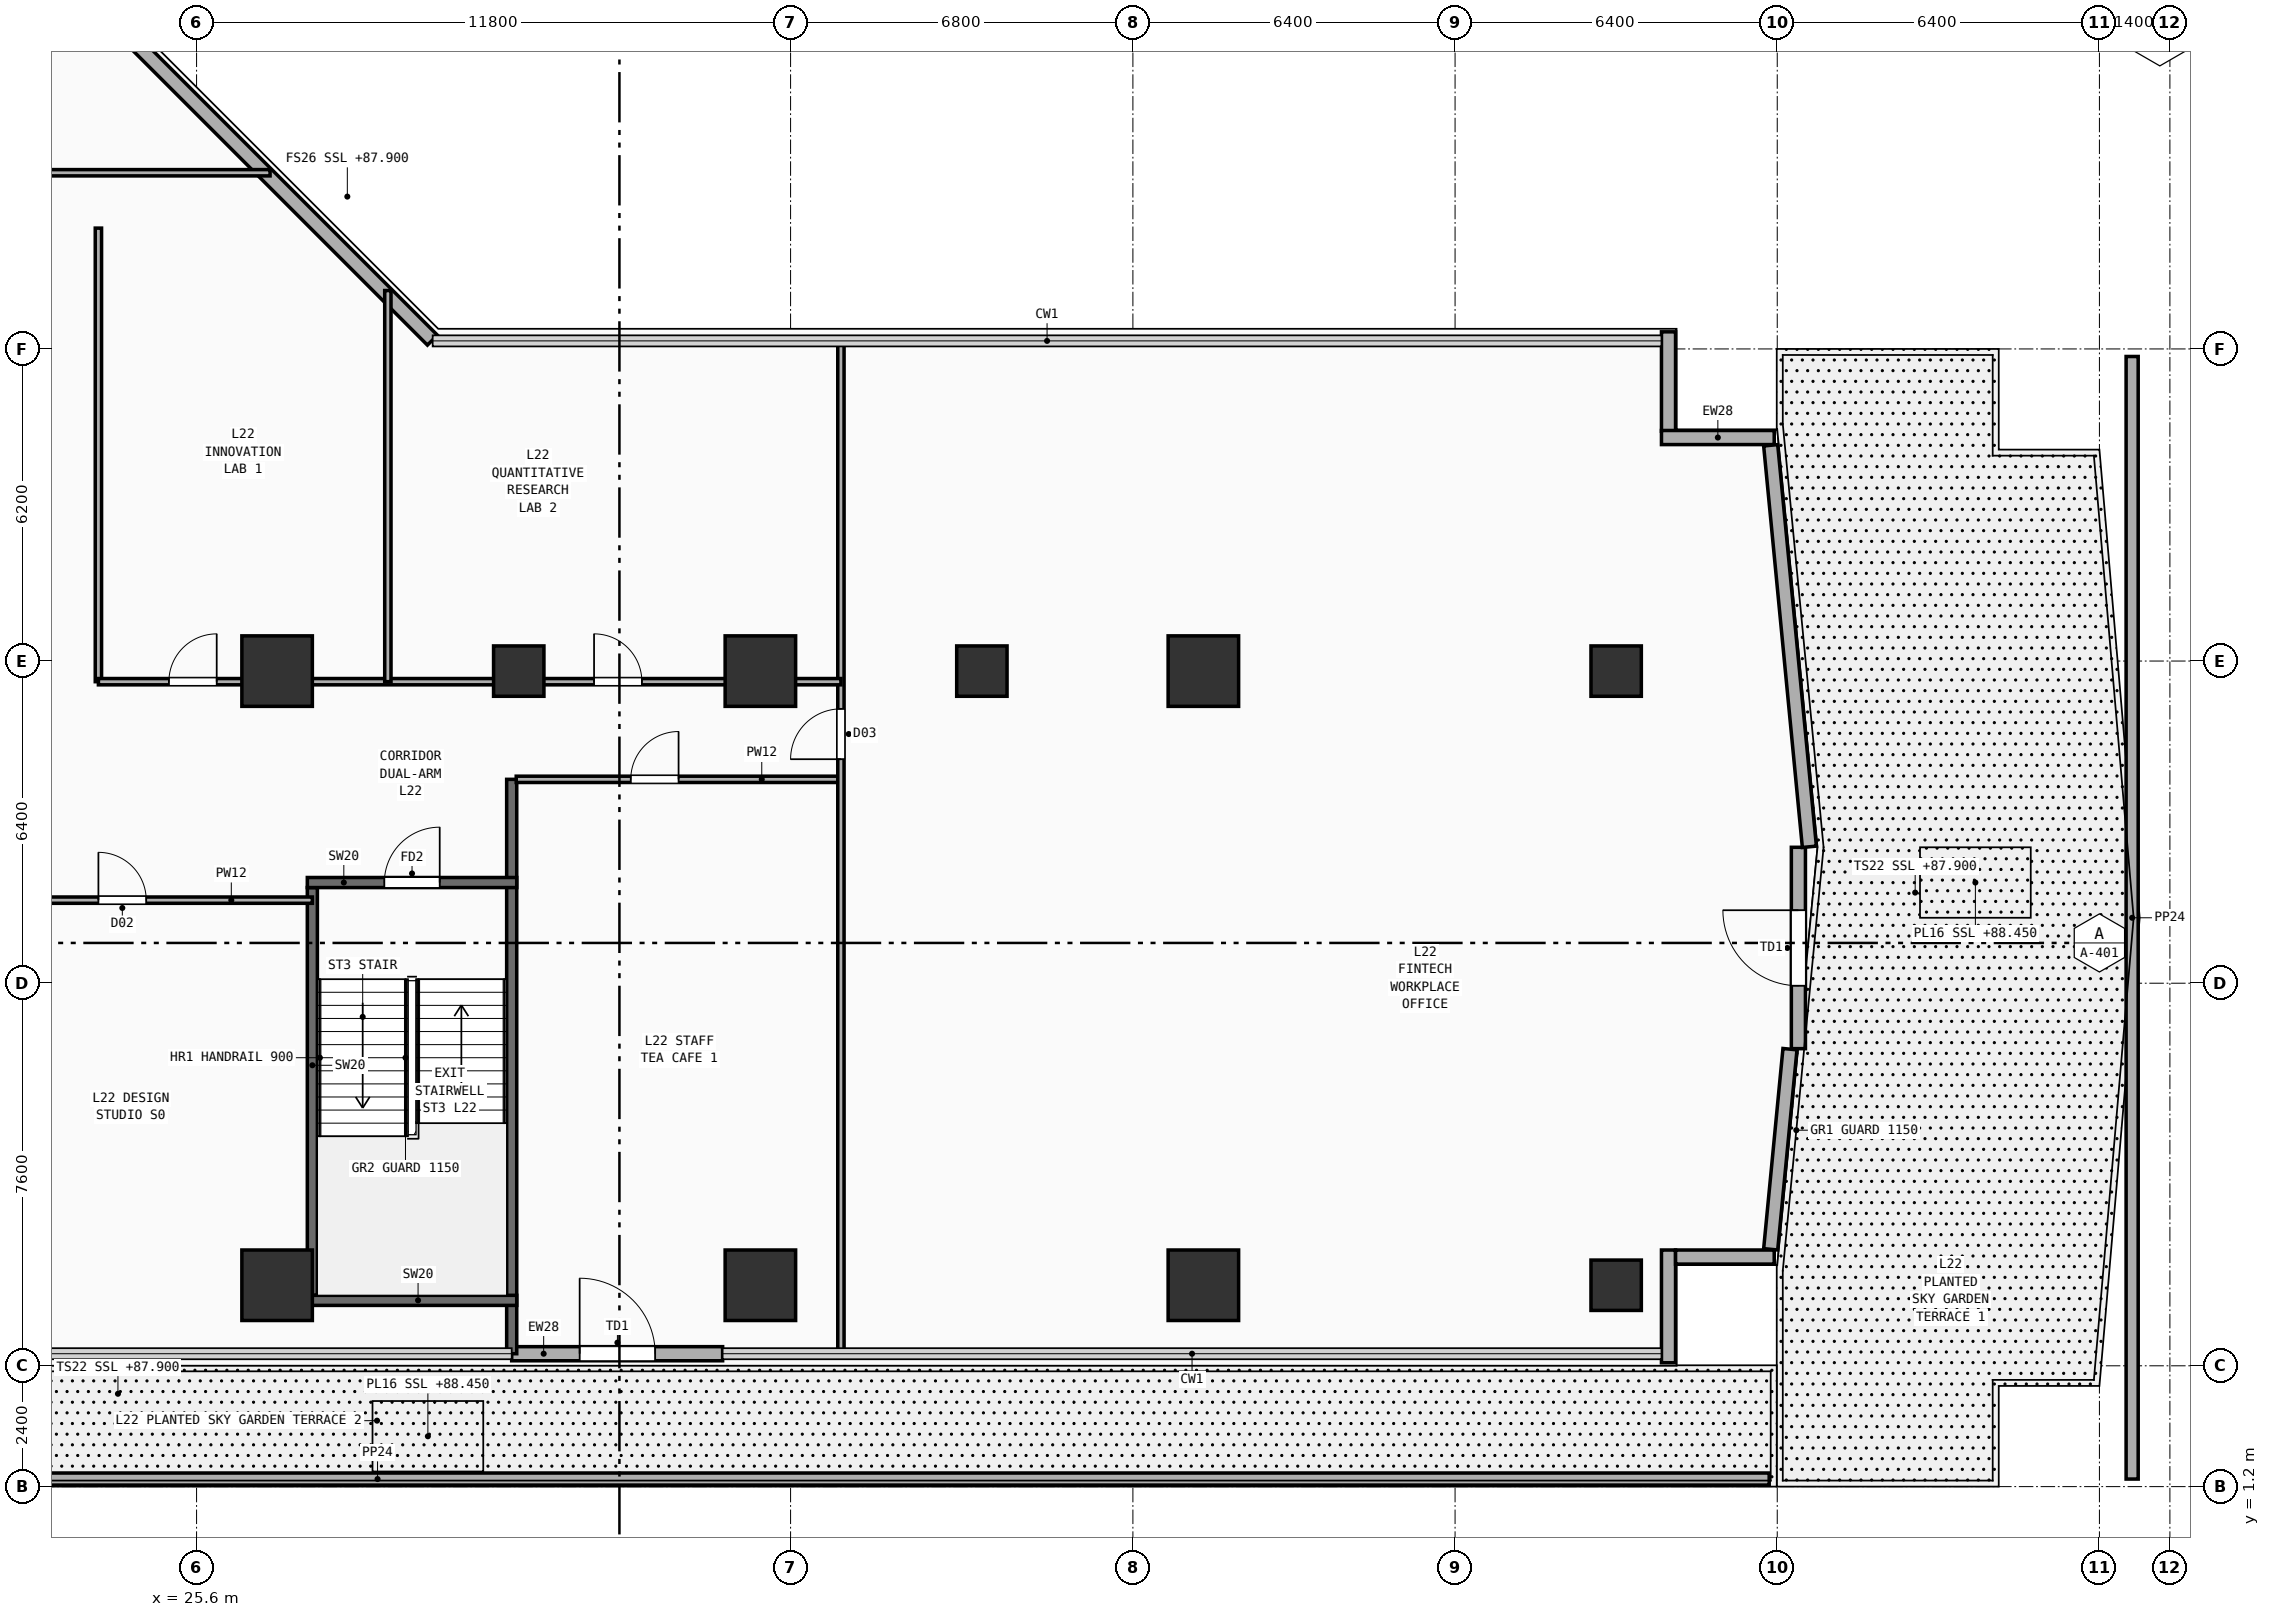
"""IFC4 building model, lengths in metres.
Left out: names, types, materials, properties, quantities, classifications, styles, units other than length and angle.
Written with IfcOpenShell. Run it as: python <this file> out.ifc"""

import sys

from ifc_helpers import new_model, si_unit, direction, frame, frame_2d, origin, origin_2d, place, context, subcontext, project, spatial, rectangle, extrude, element, fill, save


model = new_model("IFC4")
c1 = context("Model", 3, precision=1e-05, world=origin(), true_north=direction((0.0, 1.0)))
c2 = subcontext(c1, "Body", "Model", "MODEL_VIEW")
j1 = project(units=[si_unit("LENGTHUNIT", "METRE"), si_unit("PLANEANGLEUNIT", "RADIAN")], contexts=[c1])
p1 = place(None, origin())
s1 = spatial("IfcSite", under=j1, at=p1, CompositionType="ELEMENT")
p2 = place(p1, origin())
s2 = spatial("IfcBuilding", under=s1, at=p2, CompositionType="ELEMENT")
p3 = place(p2, frame((0.0, 0.0, 87.9)))
s3 = spatial("IfcBuildingStorey", under=s2, at=p3, CompositionType="ELEMENT", Elevation=87.9)
for number, where, z_axis, x_axis in (
    (1, (27.2, 5.2, 0.0), (0.0, 0.0, 1.0), (1.0, 0.0, 0.0)),
    (2, (36.8, 5.2, 0.0), (0.0, 0.0, 1.0), (1.0, 0.0, 0.0)),
    (3, (45.6, 5.2, 0.0), (0.0, 0.0, 1.0), (1.0, 0.0, 0.0)),
    (4, (27.2, 17.4, 0.0), (0.0, 0.0, 1.0), (1.0, 0.0, 0.0)),
    (5, (36.8, 17.4, 0.0), (0.0, 0.0, 1.0), (1.0, 0.0, 0.0)),
    (6, (45.6, 17.4, 0.0), (0.0, 0.0, 1.0), (1.0, 0.0, 0.0)),
):
    element("IfcColumn", number, at=place(p3, frame(where, z_axis=z_axis, x_axis=x_axis)), inside=s3, PredefinedType="COLUMN", context=c2, shape_type="SweptSolid", body=[
        extrude(rectangle(XDim=1.4, YDim=1.4, at=origin_2d()), origin(), (0.0, 0.0, 1.0), 3.54),
    ])
for number, where, z_axis, x_axis in (
    (7, (53.8, 5.2, 0.0), (0.0, 0.0, 1.0), (1.0, 0.0, 0.0)),
    (8, (53.8, 17.4, 0.0), (0.0, 0.0, 1.0), (1.0, 0.0, 0.0)),
    (9, (32.0, 17.4, 0.0), (0.0, 0.0, 1.0), (1.0, 0.0, 0.0)),
    (10, (41.2, 17.4, 0.0), (0.0, 0.0, 1.0), (1.0, 0.0, 0.0)),
):
    element("IfcColumn", number, at=place(p3, frame(where, z_axis=z_axis, x_axis=x_axis)), inside=s3, PredefinedType="COLUMN", context=c2, shape_type="SweptSolid", body=[
        extrude(rectangle(XDim=1.0, YDim=1.0, at=origin_2d()), origin(), (0.0, 0.0, 1.0), 3.54),
    ])
p4 = place(p3, frame((57.42, 9.9, 0.0), z_axis=(0.0, 0.0, 1.0), x_axis=(0.0, 1.0, 0.0)))
e11 = element("IfcWall", 11, at=p4, inside=s3, PredefinedType="SOLIDWALL", context=c2, shape_type="SweptSolid", body=[
    extrude(rectangle(XDim=4.0, YDim=0.28, at=frame_2d((2.0, 0.0))), origin(), (0.0, 0.0, 1.0), 3.54),
])
p5 = place(p4, frame((1.25, 0.0, 0.0)))
e12 = element("IfcOpeningElement", 12, at=p5, cuts=e11, PredefinedType="OPENING", context=c2, shape_type="SweptSolid", body=[
    extrude(rectangle(XDim=1.5, YDim=2.25, at=frame_2d((0.75, 1.125))), frame((0.0, 0.15, 0.0), z_axis=(0.0, -1.0, 0.0), x_axis=(1.0, 0.0, 0.0)), (0.0, 0.0, 1.0), 0.3),
])
p6 = place(p3, frame((64.05, 1.35, 0.0), z_axis=(0.0, 0.0, 1.0), x_axis=(0.0, 1.0, 0.0)))
e13 = element("IfcWall", 13, at=p6, inside=s3, PredefinedType="PARAPET", context=c2, shape_type="SweptSolid", body=[
    extrude(rectangle(XDim=22.3, YDim=0.24, at=frame_2d((11.15, 0.0))), origin(), (0.0, 0.0, 1.0), 0.42),
])
p7 = place(p3, frame((31.86, 3.84, 0.0), z_axis=(0.0, 0.0, 1.0), x_axis=(1.0, 0.0, 0.0)))
e14 = element("IfcWall", 14, at=p7, inside=s3, PredefinedType="SOLIDWALL", context=c2, shape_type="SweptSolid", body=[
    extrude(rectangle(XDim=4.19, YDim=0.28, at=frame_2d((2.095, 0.0))), origin(), (0.0, 0.0, 1.0), 3.54),
])
p8 = place(p7, frame((1.35, 0.0, 0.0)))
e15 = element("IfcOpeningElement", 15, at=p8, cuts=e14, PredefinedType="OPENING", context=c2, shape_type="SweptSolid", body=[
    extrude(rectangle(XDim=1.5, YDim=2.25, at=frame_2d((0.75, 1.125))), frame((0.0, 0.15, 0.0), z_axis=(0.0, -1.0, 0.0), x_axis=(1.0, 0.0, 0.0)), (0.0, 0.0, 1.0), 0.3),
])
p9 = place(p3, frame((1.55, 1.35, 0.0), z_axis=(0.0, 0.0, 1.0), x_axis=(1.0, 0.0, 0.0)))
e16 = element("IfcWall", 16, at=p9, inside=s3, PredefinedType="PARAPET", context=c2, shape_type="SweptSolid", body=[
    extrude(rectangle(XDim=55.29, YDim=0.24, at=frame_2d((27.645, 0.0))), origin(), (0.0, 0.0, 1.0), 0.42),
])
p10 = place(p3, frame((54.84, 3.66, 0.0), z_axis=(0.0, 0.0, 1.0), x_axis=(0.0, 1.0, 0.0)))
e17 = element("IfcWall", 17, at=p10, inside=s3, PredefinedType="SOLIDWALL", context=c2, shape_type="SweptSolid", body=[
    extrude(rectangle(XDim=2.24, YDim=0.28, at=frame_2d((1.12, 0.0))), origin(), (0.0, 0.0, 1.0), 3.54),
])
p11 = place(p3, frame((54.98, 5.76, 0.0), z_axis=(0.0, 0.0, 1.0), x_axis=(1.0, 0.0, 0.0)))
e18 = element("IfcWall", 18, at=p11, inside=s3, PredefinedType="SOLIDWALL", context=c2, shape_type="SweptSolid", body=[
    extrude(rectangle(XDim=1.96, YDim=0.28, at=frame_2d((0.98, 0.0))), origin(), (0.0, 0.0, 1.0), 3.54),
])
p12 = place(p3, frame((54.84, 22.165, 0.0), z_axis=(0.0, 0.0, 1.0), x_axis=(0.0, 1.0, 0.0)))
e19 = element("IfcWall", 19, at=p12, inside=s3, PredefinedType="SOLIDWALL", context=c2, shape_type="SweptSolid", body=[
    extrude(rectangle(XDim=1.975, YDim=0.28, at=frame_2d((0.987, 0.0))), origin(), (0.0, 0.0, 1.0), 3.54),
])
p13 = place(p3, frame((54.7, 22.04, 0.0), z_axis=(0.0, 0.0, 1.0), x_axis=(1.0, 0.0, 0.0)))
e20 = element("IfcWall", 20, at=p13, inside=s3, PredefinedType="SOLIDWALL", context=c2, shape_type="SweptSolid", body=[
    extrude(rectangle(XDim=2.24, YDim=0.28, at=frame_2d((1.12, 0.0))), origin(), (0.0, 0.0, 1.0), 3.54),
])
p14 = place(p3, frame((30.285, 23.975, 0.0), z_axis=(0.0, 0.0, 1.0), x_axis=(-0.707106781187, 0.707106781187, 0.0)))
e21 = element("IfcWall", 21, at=p14, inside=s3, PredefinedType="SOLIDWALL", context=c2, shape_type="SweptSolid", body=[
    extrude(rectangle(XDim=9.207, YDim=0.28, at=frame_2d((4.603, 0.0))), origin(), (0.0, 0.0, 1.0), 3.54),
])
p15 = place(p3, frame((56.869, 5.914, 0.0), z_axis=(0.0, 0.0, 1.0), x_axis=(0.095962807789, 0.99538492028, 0.0)))
e22 = element("IfcWall", 22, at=p15, inside=s3, PredefinedType="SOLIDWALL", context=c2, shape_type="SweptSolid", body=[
    extrude(rectangle(XDim=3.994, YDim=0.28, at=frame_2d((1.997, 0.0))), origin(), (0.0, 0.0, 1.0), 3.54),
])
p16 = place(p3, frame((57.638, 13.91, 0.0), z_axis=(0.0, 0.0, 1.0), x_axis=(-0.095943464516, 0.995386784932, 0.0)))
e23 = element("IfcWall", 23, at=p16, inside=s3, PredefinedType="SOLIDWALL", context=c2, shape_type="SweptSolid", body=[
    extrude(rectangle(XDim=8.013, YDim=0.28, at=frame_2d((4.006, 0.0))), origin(), (0.0, 0.0, 1.0), 3.54),
])
p17 = place(p3, frame((27.9, 5.0, 0.0), z_axis=(0.0, 0.0, 1.0), x_axis=(0.0, 1.0, 0.0)))
e24 = element("IfcWall", 24, at=p17, inside=s3, PredefinedType="SHEAR", context=c2, shape_type="SweptSolid", body=[
    extrude(rectangle(XDim=8.1, YDim=0.2, at=frame_2d((4.05, 0.0))), origin(), (0.0, 0.0, 1.0), 3.54),
])
p18 = place(p3, frame((31.86, 3.84, 0.0), z_axis=(0.0, 0.0, 1.0), x_axis=(0.0, 1.0, 0.0)))
e25 = element("IfcWall", 25, at=p18, inside=s3, PredefinedType="SHEAR", context=c2, shape_type="SweptSolid", body=[
    extrude(rectangle(XDim=11.41, YDim=0.2, at=frame_2d((5.705, 0.0))), origin(), (0.0, 0.0, 1.0), 3.54),
])
p19 = place(p3, frame((27.8, 4.9, 0.0), z_axis=(0.0, 0.0, 1.0), x_axis=(1.0, 0.0, 0.0)))
e26 = element("IfcWall", 26, at=p19, inside=s3, PredefinedType="SHEAR", context=c2, shape_type="SweptSolid", body=[
    extrude(rectangle(XDim=4.16, YDim=0.2, at=frame_2d((2.08, 0.0))), origin(), (0.0, 0.0, 1.0), 3.54),
])
p20 = place(p3, frame((27.8, 13.2, 0.0), z_axis=(0.0, 0.0, 1.0), x_axis=(1.0, 0.0, 0.0)))
e27 = element("IfcWall", 27, at=p20, inside=s3, PredefinedType="SHEAR", context=c2, shape_type="SweptSolid", body=[
    extrude(rectangle(XDim=4.16, YDim=0.2, at=frame_2d((2.08, 0.0))), origin(), (0.0, 0.0, 1.0), 3.54),
])
p21 = place(p20, frame((1.53, 0.0, 0.0)))
e28 = element("IfcOpeningElement", 28, at=p21, cuts=e27, PredefinedType="OPENING", context=c2, shape_type="SweptSolid", body=[
    extrude(rectangle(XDim=1.1, YDim=2.2, at=frame_2d((0.55, 1.1))), frame((0.0, 0.11, 0.0), z_axis=(0.0, -1.0, 0.0), x_axis=(1.0, 0.0, 0.0)), (0.0, 0.0, 1.0), 0.22),
])
p22 = place(p3, frame((20.85, 12.85, 0.0), z_axis=(0.0, 0.0, 1.0), x_axis=(1.0, 0.0, 0.0)))
e29 = element("IfcWall", 29, at=p22, inside=s3, PredefinedType="PARTITIONING", context=c2, shape_type="SweptSolid", body=[
    extrude(rectangle(XDim=7.05, YDim=0.125, at=frame_2d((3.525, 0.0))), origin(), (0.0, 0.0, 1.0), 3.54),
])
p23 = place(p22, frame((2.8, 0.0, 0.0)))
e30 = element("IfcOpeningElement", 30, at=p23, cuts=e29, PredefinedType="OPENING", context=c2, shape_type="SweptSolid", body=[
    extrude(rectangle(XDim=0.95, YDim=2.15, at=frame_2d((0.475, 1.075))), frame((0.0, 0.073, 0.0), z_axis=(0.0, -1.0, 0.0), x_axis=(1.0, 0.0, 0.0)), (0.0, 0.0, 1.0), 0.145),
])
p24 = place(p3, frame((31.95, 15.25, 0.0), z_axis=(0.0, 0.0, 1.0), x_axis=(1.0, 0.0, 0.0)))
e31 = element("IfcWall", 31, at=p24, inside=s3, PredefinedType="PARTITIONING", context=c2, shape_type="SweptSolid", body=[
    extrude(rectangle(XDim=6.45, YDim=0.125, at=frame_2d((3.225, 0.0))), origin(), (0.0, 0.0, 1.0), 3.09),
])
p25 = place(p24, frame((2.275, 0.0, 0.0)))
e32 = element("IfcOpeningElement", 32, at=p25, cuts=e31, PredefinedType="OPENING", context=c2, shape_type="SweptSolid", body=[
    extrude(rectangle(XDim=0.95, YDim=2.15, at=frame_2d((0.475, 1.075))), frame((0.0, 0.073, 0.0), z_axis=(0.0, -1.0, 0.0), x_axis=(1.0, 0.0, 0.0)), (0.0, 0.0, 1.0), 0.145),
])
p26 = place(p3, frame((38.4, 3.84, 0.0), z_axis=(0.0, 0.0, 1.0), x_axis=(0.0, 1.0, 0.0)))
e33 = element("IfcWall", 33, at=p26, inside=s3, PredefinedType="PARTITIONING", context=c2, shape_type="SweptSolid", body=[
    extrude(rectangle(XDim=20.12, YDim=0.125, at=frame_2d((10.06, 0.0))), origin(), (0.0, 0.0, 1.0), 3.54),
])
p27 = place(p26, frame((11.81, 0.0, 0.0)))
e34 = element("IfcOpeningElement", 34, at=p27, cuts=e33, PredefinedType="OPENING", context=c2, shape_type="SweptSolid", body=[
    extrude(rectangle(XDim=1.0, YDim=2.2, at=frame_2d((0.5, 1.1))), frame((0.0, 0.073, 0.0), z_axis=(0.0, -1.0, 0.0), x_axis=(1.0, 0.0, 0.0)), (0.0, 0.0, 1.0), 0.145),
])
p28 = place(p3, frame((23.65, 17.19, 0.0), z_axis=(0.0, 0.0, 1.0), x_axis=(0.0, 1.0, 0.0)))
e35 = element("IfcWall", 35, at=p28, inside=s3, PredefinedType="PARTITIONING", context=c2, shape_type="SweptSolid", body=[
    extrude(rectangle(XDim=9.01, YDim=0.125, at=frame_2d((4.505, 0.0))), origin(), (0.0, 0.0, 1.0), 3.54),
])
p29 = place(p3, frame((23.65, 17.19, 0.0), z_axis=(0.0, 0.0, 1.0), x_axis=(1.0, 0.0, 0.0)))
e36 = element("IfcWall", 36, at=p29, inside=s3, PredefinedType="PARTITIONING", context=c2, shape_type="SweptSolid", body=[
    extrude(rectangle(XDim=14.75, YDim=0.125, at=frame_2d((7.375, 0.0))), origin(), (0.0, 0.0, 1.0), 3.24),
])
p30 = place(p29, frame((1.4, 0.0, 0.0)))
e37 = element("IfcOpeningElement", 37, at=p30, cuts=e36, PredefinedType="OPENING", context=c2, shape_type="SweptSolid", body=[
    extrude(rectangle(XDim=0.95, YDim=2.15, at=frame_2d((0.475, 1.075))), frame((0.0, 0.073, 0.0), z_axis=(0.0, -1.0, 0.0), x_axis=(1.0, 0.0, 0.0)), (0.0, 0.0, 1.0), 0.145),
])
p31 = place(p29, frame((9.846, 0.0, 0.0)))
e38 = element("IfcOpeningElement", 38, at=p31, cuts=e36, PredefinedType="OPENING", context=c2, shape_type="SweptSolid", body=[
    extrude(rectangle(XDim=0.95, YDim=2.15, at=frame_2d((0.475, 1.075))), frame((0.0, 0.073, 0.0), z_axis=(0.0, -1.0, 0.0), x_axis=(1.0, 0.0, 0.0)), (0.0, 0.0, 1.0), 0.145),
])
p32 = place(p3, frame((29.4, 17.19, 0.0), z_axis=(0.0, 0.0, 1.0), x_axis=(0.0, 1.0, 0.0)))
e39 = element("IfcWall", 39, at=p32, inside=s3, PredefinedType="PARTITIONING", context=c2, shape_type="SweptSolid", body=[
    extrude(rectangle(XDim=7.77, YDim=0.125, at=frame_2d((3.885, 0.0))), origin(), (0.0, 0.0, 1.0), 3.54),
])
p33 = place(p3, frame((15.54, 27.3, 0.0), z_axis=(0.0, 0.0, 1.0), x_axis=(1.0, 0.0, 0.0)))
e40 = element("IfcWall", 40, at=p33, inside=s3, PredefinedType="PARTITIONING", context=c2, shape_type="SweptSolid", body=[
    extrude(rectangle(XDim=11.52, YDim=0.125, at=frame_2d((5.76, 0.0))), origin(), (0.0, 0.0, 1.0), 3.54),
])
p34 = place(p5, frame((1.5, 0.0, 0.0), z_axis=(0.0, 0.0, 1.0), x_axis=(-1.0, 0.0, 0.0)))
e41 = element("IfcDoor", 41, at=p34, inside=s3, OperationType="SINGLE_SWING_LEFT", PredefinedType="DOOR", context=c2, shape_type="SweptSolid", body=[
    extrude(rectangle(XDim=1.5, YDim=2.25, at=frame_2d((0.75, 1.125))), frame((0.0, 0.025, 0.0), z_axis=(0.0, -1.0, 0.0), x_axis=(1.0, 0.0, 0.0)), (0.0, 0.0, 1.0), 0.05),
])
fill(e12, e41)
p35 = place(p8, frame((1.5, 0.0, 0.0), z_axis=(0.0, 0.0, 1.0), x_axis=(-1.0, 0.0, 0.0)))
e42 = element("IfcDoor", 42, at=p35, inside=s3, OperationType="SINGLE_SWING_RIGHT", PredefinedType="DOOR", context=c2, shape_type="SweptSolid", body=[
    extrude(rectangle(XDim=1.5, YDim=2.25, at=frame_2d((0.75, 1.125))), frame((0.0, 0.025, 0.0), z_axis=(0.0, -1.0, 0.0), x_axis=(1.0, 0.0, 0.0)), (0.0, 0.0, 1.0), 0.05),
])
fill(e15, e42)
p36 = place(p21, frame((1.1, 0.0, 0.0), z_axis=(0.0, 0.0, 1.0), x_axis=(-1.0, 0.0, 0.0)))
e43 = element("IfcDoor", 43, at=p36, inside=s3, OperationType="SINGLE_SWING_LEFT", PredefinedType="DOOR", context=c2, shape_type="SweptSolid", body=[
    extrude(rectangle(XDim=1.1, YDim=2.2, at=frame_2d((0.55, 1.1))), frame((0.0, 0.025, 0.0), z_axis=(0.0, -1.0, 0.0), x_axis=(1.0, 0.0, 0.0)), (0.0, 0.0, 1.0), 0.05),
])
fill(e28, e43)
p37 = place(p23, origin())
e44 = element("IfcDoor", 44, at=p37, inside=s3, OperationType="SINGLE_SWING_LEFT", PredefinedType="DOOR", context=c2, shape_type="SweptSolid", body=[
    extrude(rectangle(XDim=0.95, YDim=2.15, at=frame_2d((0.475, 1.075))), frame((0.0, 0.025, 0.0), z_axis=(0.0, -1.0, 0.0), x_axis=(1.0, 0.0, 0.0)), (0.0, 0.0, 1.0), 0.05),
])
fill(e30, e44)
p38 = place(p25, origin())
e45 = element("IfcDoor", 45, at=p38, inside=s3, OperationType="SINGLE_SWING_RIGHT", PredefinedType="DOOR", context=c2, shape_type="SweptSolid", body=[
    extrude(rectangle(XDim=0.95, YDim=2.15, at=frame_2d((0.475, 1.075))), frame((0.0, 0.025, 0.0), z_axis=(0.0, -1.0, 0.0), x_axis=(1.0, 0.0, 0.0)), (0.0, 0.0, 1.0), 0.05),
])
fill(e32, e45)
p39 = place(p27, origin())
e46 = element("IfcDoor", 46, at=p39, inside=s3, OperationType="SINGLE_SWING_LEFT", PredefinedType="DOOR", context=c2, shape_type="SweptSolid", body=[
    extrude(rectangle(XDim=1.0, YDim=2.2, at=frame_2d((0.5, 1.1))), frame((0.0, 0.025, 0.0), z_axis=(0.0, -1.0, 0.0), x_axis=(1.0, 0.0, 0.0)), (0.0, 0.0, 1.0), 0.05),
])
fill(e34, e46)
p40 = place(p30, origin())
e47 = element("IfcDoor", 47, at=p40, inside=s3, OperationType="SINGLE_SWING_RIGHT", PredefinedType="DOOR", context=c2, shape_type="SweptSolid", body=[
    extrude(rectangle(XDim=0.95, YDim=2.15, at=frame_2d((0.475, 1.075))), frame((0.0, 0.025, 0.0), z_axis=(0.0, -1.0, 0.0), x_axis=(1.0, 0.0, 0.0)), (0.0, 0.0, 1.0), 0.05),
])
fill(e37, e47)
p41 = place(p31, origin())
e48 = element("IfcDoor", 48, at=p41, inside=s3, OperationType="SINGLE_SWING_LEFT", PredefinedType="DOOR", context=c2, shape_type="SweptSolid", body=[
    extrude(rectangle(XDim=0.95, YDim=2.15, at=frame_2d((0.475, 1.075))), frame((0.0, 0.025, 0.0), z_axis=(0.0, -1.0, 0.0), x_axis=(1.0, 0.0, 0.0)), (0.0, 0.0, 1.0), 0.05),
])
fill(e38, e48)
save(model, sys.argv[1])
